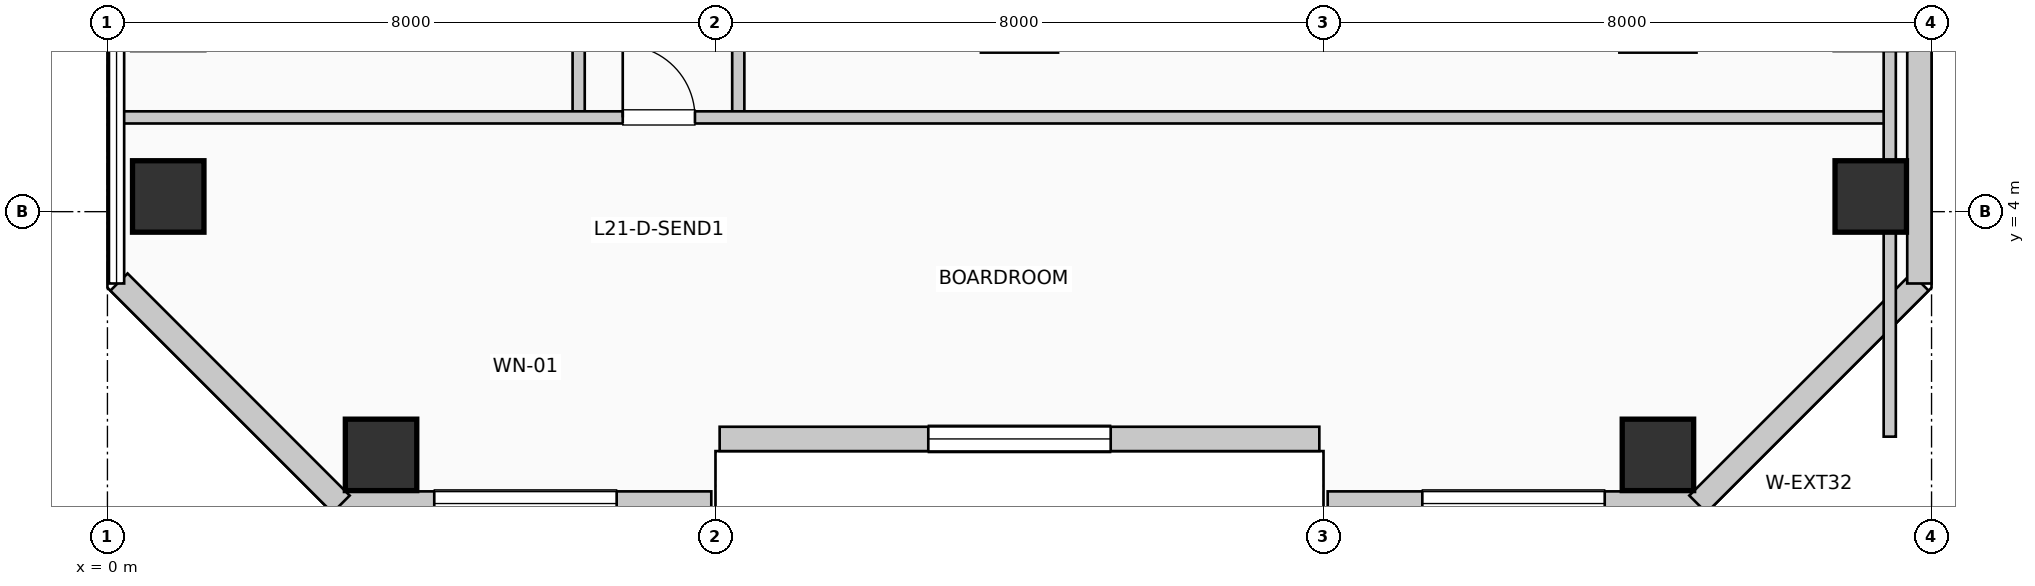
"""IFC4 building model, lengths in metres.
Left out: names, types, materials, properties, quantities, classifications, styles, units other than length and angle.
Written with IfcOpenShell. Run it as: python <this file> out.ifc"""

import sys

from ifc_helpers import new_model, si_unit, direction, frame, frame_2d, origin, origin_2d, place, context, subcontext, project, spatial, rectangle, extrude, element, fill, save


model = new_model("IFC4")
c1 = context("Model", 3, precision=1e-05, world=origin(), true_north=direction((0.0, 1.0)))
c2 = subcontext(c1, "Body", "Model", "MODEL_VIEW")
j1 = project(units=[si_unit("LENGTHUNIT", "METRE"), si_unit("PLANEANGLEUNIT", "RADIAN")], contexts=[c1])
p1 = place(None, origin())
s1 = spatial("IfcSite", under=j1, at=p1, CompositionType="ELEMENT")
p2 = place(p1, origin())
s2 = spatial("IfcBuilding", under=s1, at=p2, CompositionType="ELEMENT")
p3 = place(p2, frame((0.0, 0.0, 89.76)))
s3 = spatial("IfcBuildingStorey", under=s2, at=p3, CompositionType="ELEMENT", Elevation=89.76)
for number, where, z_axis, x_axis in (
    (1, (0.8, 4.2, 0.0), (0.0, 0.0, 1.0), (1.0, 0.0, 0.0)),
    (2, (3.6, 0.8, 0.0), (0.0, 0.0, 1.0), (1.0, 0.0, 0.0)),
    (3, (20.4, 0.8, 0.0), (0.0, 0.0, 1.0), (1.0, 0.0, 0.0)),
    (4, (23.2, 4.2, 0.0), (0.0, 0.0, 1.0), (1.0, 0.0, 0.0)),
):
    element("IfcColumn", number, at=place(p3, frame(where, z_axis=z_axis, x_axis=x_axis)), inside=s3, PredefinedType="COLUMN", context=c2, shape_type="SweptSolid", body=[
        extrude(rectangle(XDim=0.94, YDim=0.94, at=origin_2d()), origin(), (0.0, 0.0, 1.0), 3.96),
    ])
p4 = place(p3, frame((3.055, 0.16, 0.0), z_axis=(0.0, 0.0, 1.0), x_axis=(1.0, 0.0, 0.0)))
e5 = element("IfcWall", 5, at=p4, inside=s3, PredefinedType="SOLIDWALL", context=c2, shape_type="SweptSolid", body=[
    extrude(rectangle(XDim=4.89, YDim=0.32, at=frame_2d((2.445, 0.0))), origin(), (0.0, 0.0, 1.0), 3.61),
])
p5 = place(p4, frame((1.245, 0.0, 0.85)))
e6 = element("IfcOpeningElement", 6, at=p5, cuts=e5, PredefinedType="OPENING", context=c2, shape_type="SweptSolid", body=[
    extrude(rectangle(XDim=2.4, YDim=2.05, at=frame_2d((1.2, 1.025))), frame((0.0, 0.17, 0.0), z_axis=(0.0, -1.0, 0.0), x_axis=(1.0, 0.0, 0.0)), (0.0, 0.0, 1.0), 0.34),
])
p6 = place(p3, frame((8.055, 1.01, 0.0), z_axis=(0.0, 0.0, 1.0), x_axis=(1.0, 0.0, 0.0)))
e7 = element("IfcWall", 7, at=p6, inside=s3, PredefinedType="SOLIDWALL", context=c2, shape_type="SweptSolid", body=[
    extrude(rectangle(XDim=7.89, YDim=0.32, at=frame_2d((3.945, 0.0))), origin(), (0.0, 0.0, 1.0), 3.61),
])
p7 = place(p6, frame((2.745, 0.0, 0.85)))
e8 = element("IfcOpeningElement", 8, at=p7, cuts=e7, PredefinedType="OPENING", context=c2, shape_type="SweptSolid", body=[
    extrude(rectangle(XDim=2.4, YDim=2.05, at=frame_2d((1.2, 1.025))), frame((0.0, 0.17, 0.0), z_axis=(0.0, -1.0, 0.0), x_axis=(1.0, 0.0, 0.0)), (0.0, 0.0, 1.0), 0.34),
])
p8 = place(p3, frame((16.055, 0.16, 0.0), z_axis=(0.0, 0.0, 1.0), x_axis=(1.0, 0.0, 0.0)))
e9 = element("IfcWall", 9, at=p8, inside=s3, PredefinedType="SOLIDWALL", context=c2, shape_type="SweptSolid", body=[
    extrude(rectangle(XDim=4.89, YDim=0.32, at=frame_2d((2.445, 0.0))), origin(), (0.0, 0.0, 1.0), 3.61),
])
p9 = place(p8, frame((1.245, 0.0, 0.85)))
e10 = element("IfcOpeningElement", 10, at=p9, cuts=e9, PredefinedType="OPENING", context=c2, shape_type="SweptSolid", body=[
    extrude(rectangle(XDim=2.4, YDim=2.05, at=frame_2d((1.2, 1.025))), frame((0.0, 0.17, 0.0), z_axis=(0.0, -1.0, 0.0), x_axis=(1.0, 0.0, 0.0)), (0.0, 0.0, 1.0), 0.34),
])
p10 = place(p3, frame((20.926, 0.152, 0.0), z_axis=(0.0, 0.0, 1.0), x_axis=(0.707106781187, 0.707106781187, 0.0)))
e11 = element("IfcWall", 11, at=p10, inside=s3, PredefinedType="SOLIDWALL", context=c2, shape_type="SweptSolid", body=[
    extrude(rectangle(XDim=4.133, YDim=0.32, at=frame_2d((2.066, 0.0))), origin(), (0.0, 0.0, 1.0), 3.61),
])
p11 = place(p3, frame((23.84, 3.055, 0.0), z_axis=(0.0, 0.0, 1.0), x_axis=(0.0, 1.0, 0.0)))
e12 = element("IfcWall", 12, at=p11, inside=s3, PredefinedType="SOLIDWALL", context=c2, shape_type="SweptSolid", body=[
    extrude(rectangle(XDim=12.89, YDim=0.32, at=frame_2d((6.445, 0.0))), origin(), (0.0, 0.0, 1.0), 3.61),
])
p12 = place(p3, frame((0.152, 3.074, 0.0), z_axis=(0.0, 0.0, 1.0), x_axis=(0.707106781187, -0.707106781187, 0.0)))
e13 = element("IfcWall", 13, at=p12, inside=s3, PredefinedType="SOLIDWALL", context=c2, shape_type="SweptSolid", body=[
    extrude(rectangle(XDim=4.133, YDim=0.32, at=frame_2d((2.066, 0.0))), origin(), (0.0, 0.0, 1.0), 3.61),
])
p13 = place(p3, frame((6.2, 5.24, 0.0), z_axis=(0.0, 0.0, 1.0), x_axis=(0.0, 1.0, 0.0)))
e14 = element("IfcWall", 14, at=p13, inside=s3, PredefinedType="PARTITIONING", context=c2, shape_type="SweptSolid", body=[
    extrude(rectangle(XDim=24.16, YDim=0.16, at=frame_2d((12.08, 0.0))), origin(), (0.0, 0.0, 1.0), 3.61),
])
p14 = place(p13, frame((4.099, 0.0, 0.0), z_axis=(0.0, 0.0, 1.0), x_axis=(-1.0, 0.0, 0.0)))
e15 = element("IfcOpeningElement", 15, at=p14, cuts=e14, PredefinedType="OPENING", context=c2, shape_type="SweptSolid", body=[
    extrude(rectangle(XDim=0.95, YDim=2.15, at=frame_2d((0.475, 1.075))), frame((0.0, 0.09, 0.0), z_axis=(0.0, -1.0, 0.0), x_axis=(1.0, 0.0, 0.0)), (0.0, 0.0, 1.0), 0.18),
])
p15 = place(p13, frame((11.589, 0.0, 0.0), z_axis=(0.0, 0.0, 1.0), x_axis=(-1.0, 0.0, 0.0)))
e16 = element("IfcOpeningElement", 16, at=p15, cuts=e14, PredefinedType="OPENING", context=c2, shape_type="SweptSolid", body=[
    extrude(rectangle(XDim=0.95, YDim=2.15, at=frame_2d((0.475, 1.075))), frame((0.0, 0.09, 0.0), z_axis=(0.0, -1.0, 0.0), x_axis=(1.0, 0.0, 0.0)), (0.0, 0.0, 1.0), 0.18),
])
p16 = place(p13, frame((20.044, 0.0, 0.0), z_axis=(0.0, 0.0, 1.0), x_axis=(-1.0, 0.0, 0.0)))
e17 = element("IfcOpeningElement", 17, at=p16, cuts=e14, PredefinedType="OPENING", context=c2, shape_type="SweptSolid", body=[
    extrude(rectangle(XDim=0.95, YDim=2.15, at=frame_2d((0.475, 1.075))), frame((0.0, 0.09, 0.0), z_axis=(0.0, -1.0, 0.0), x_axis=(1.0, 0.0, 0.0)), (0.0, 0.0, 1.0), 0.18),
])
p17 = place(p3, frame((8.3, 5.24, 0.0), z_axis=(0.0, 0.0, 1.0), x_axis=(0.0, 1.0, 0.0)))
e18 = element("IfcWall", 18, at=p17, inside=s3, PredefinedType="PARTITIONING", context=c2, shape_type="SweptSolid", body=[
    extrude(rectangle(XDim=24.16, YDim=0.16, at=frame_2d((12.08, 0.0))), origin(), (0.0, 0.0, 1.0), 3.61),
])
p18 = place(p17, frame((2.907, 0.0, 0.0)))
e19 = element("IfcOpeningElement", 19, at=p18, cuts=e18, PredefinedType="OPENING", context=c2, shape_type="SweptSolid", body=[
    extrude(rectangle(XDim=0.95, YDim=2.15, at=frame_2d((0.475, 1.075))), frame((0.0, 0.09, 0.0), z_axis=(0.0, -1.0, 0.0), x_axis=(1.0, 0.0, 0.0)), (0.0, 0.0, 1.0), 0.18),
])
p19 = place(p17, frame((10.156, 0.0, 0.0)))
e20 = element("IfcOpeningElement", 20, at=p19, cuts=e18, PredefinedType="OPENING", context=c2, shape_type="SweptSolid", body=[
    extrude(rectangle(XDim=0.95, YDim=2.15, at=frame_2d((0.475, 1.075))), frame((0.0, 0.09, 0.0), z_axis=(0.0, -1.0, 0.0), x_axis=(1.0, 0.0, 0.0)), (0.0, 0.0, 1.0), 0.18),
])
p20 = place(p17, frame((18.853, 0.0, 0.0)))
e21 = element("IfcOpeningElement", 21, at=p20, cuts=e18, PredefinedType="OPENING", context=c2, shape_type="SweptSolid", body=[
    extrude(rectangle(XDim=0.95, YDim=2.15, at=frame_2d((0.475, 1.075))), frame((0.0, 0.09, 0.0), z_axis=(0.0, -1.0, 0.0), x_axis=(1.0, 0.0, 0.0)), (0.0, 0.0, 1.0), 0.18),
])
p21 = place(p3, frame((0.19, 5.24, 0.0), z_axis=(0.0, 0.0, 1.0), x_axis=(1.0, 0.0, 0.0)))
e22 = element("IfcWall", 22, at=p21, inside=s3, PredefinedType="PARTITIONING", context=c2, shape_type="SweptSolid", body=[
    extrude(rectangle(XDim=23.26, YDim=0.16, at=frame_2d((11.63, 0.0))), origin(), (0.0, 0.0, 1.0), 3.61),
])
p22 = place(p21, frame((6.59, 0.0, 0.0)))
e23 = element("IfcOpeningElement", 23, at=p22, cuts=e22, PredefinedType="OPENING", context=c2, shape_type="SweptSolid", body=[
    extrude(rectangle(XDim=0.95, YDim=2.15, at=frame_2d((0.475, 1.075))), frame((0.0, 0.09, 0.0), z_axis=(0.0, -1.0, 0.0), x_axis=(1.0, 0.0, 0.0)), (0.0, 0.0, 1.0), 0.18),
])
p23 = place(p3, frame((23.45, 1.04, 0.0), z_axis=(0.0, 0.0, 1.0), x_axis=(0.0, 1.0, 0.0)))
e24 = element("IfcWall", 24, at=p23, inside=s3, PredefinedType="PARTITIONING", context=c2, shape_type="SweptSolid", body=[
    extrude(rectangle(XDim=28.36, YDim=0.16, at=frame_2d((14.18, 0.0))), origin(), (0.0, 0.0, 1.0), 2.895),
])
p24 = place(p5, origin())
e25 = element("IfcWindow", 25, at=p24, inside=s3, PartitioningType="SINGLE_PANEL", PredefinedType="WINDOW", context=c2, shape_type="SweptSolid", body=[
    extrude(rectangle(XDim=2.4, YDim=2.05, at=frame_2d((1.2, 1.025))), frame((0.0, 0.03, 0.0), z_axis=(0.0, -1.0, 0.0), x_axis=(1.0, 0.0, 0.0)), (0.0, 0.0, 1.0), 0.06),
])
fill(e6, e25)
p25 = place(p7, origin())
e26 = element("IfcWindow", 26, at=p25, inside=s3, PartitioningType="SINGLE_PANEL", PredefinedType="WINDOW", context=c2, shape_type="SweptSolid", body=[
    extrude(rectangle(XDim=2.4, YDim=2.05, at=frame_2d((1.2, 1.025))), frame((0.0, 0.03, 0.0), z_axis=(0.0, -1.0, 0.0), x_axis=(1.0, 0.0, 0.0)), (0.0, 0.0, 1.0), 0.06),
])
fill(e8, e26)
p26 = place(p9, origin())
e27 = element("IfcWindow", 27, at=p26, inside=s3, PartitioningType="SINGLE_PANEL", PredefinedType="WINDOW", context=c2, shape_type="SweptSolid", body=[
    extrude(rectangle(XDim=2.4, YDim=2.05, at=frame_2d((1.2, 1.025))), frame((0.0, 0.03, 0.0), z_axis=(0.0, -1.0, 0.0), x_axis=(1.0, 0.0, 0.0)), (0.0, 0.0, 1.0), 0.06),
])
fill(e10, e27)
p27 = place(p22, origin())
e28 = element("IfcDoor", 28, at=p27, inside=s3, OperationType="SINGLE_SWING_LEFT", PredefinedType="DOOR", context=c2, shape_type="SweptSolid", body=[
    extrude(rectangle(XDim=0.95, YDim=2.15, at=frame_2d((0.475, 1.075))), frame((0.0, 0.025, 0.0), z_axis=(0.0, -1.0, 0.0), x_axis=(1.0, 0.0, 0.0)), (0.0, 0.0, 1.0), 0.05),
])
fill(e23, e28)
save(model, sys.argv[1])
